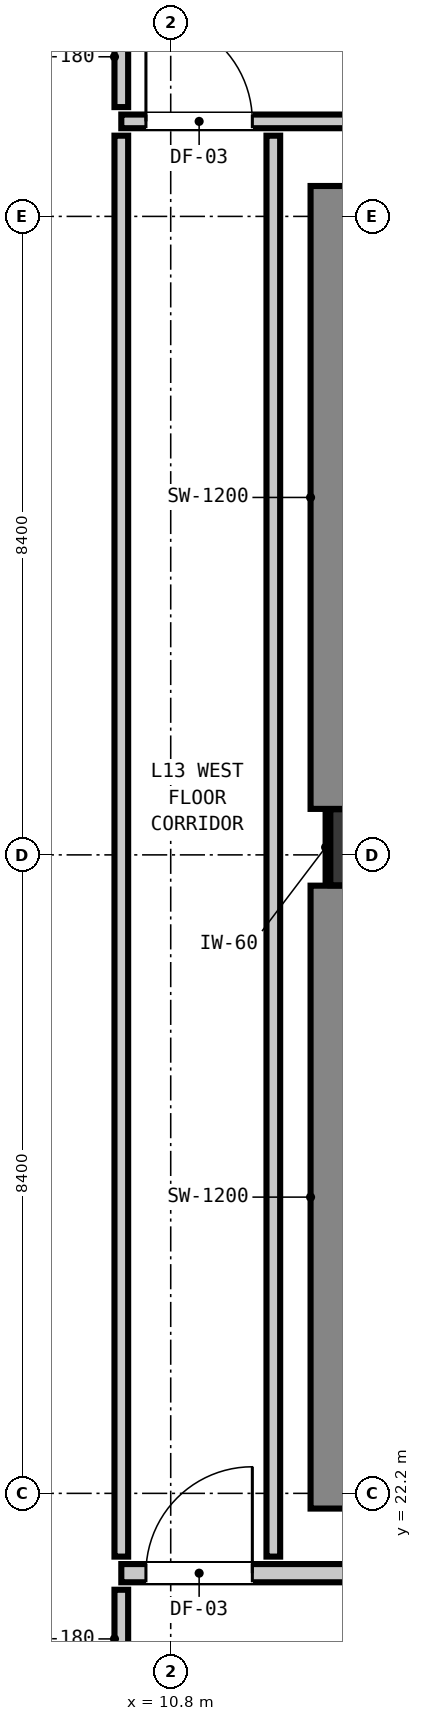
"""IFC4 building model, lengths in metres.
Left out: names, types, materials, properties, quantities, classifications, styles, units other than length and angle.
Written with IfcOpenShell. Run it as: python <this file> out.ifc"""

import sys

from ifc_helpers import new_model, si_unit, direction, frame, frame_2d, origin, origin_2d, place, context, subcontext, project, spatial, rectangle, extrude, element, fill, save


model = new_model("IFC4")
c1 = context("Model", 3, precision=1e-05, world=origin(), true_north=direction((0.0, 1.0)))
c2 = subcontext(c1, "Body", "Model", "MODEL_VIEW")
j1 = project(units=[si_unit("LENGTHUNIT", "METRE"), si_unit("PLANEANGLEUNIT", "RADIAN")], contexts=[c1])
p1 = place(None, origin())
s1 = spatial("IfcSite", under=j1, at=p1, CompositionType="ELEMENT")
p2 = place(p1, origin())
s2 = spatial("IfcBuilding", under=s1, at=p2, CompositionType="ELEMENT")
p3 = place(p2, frame((0.0, 0.0, 48.56)))
s3 = spatial("IfcBuildingStorey", under=s2, at=p3, CompositionType="ELEMENT", Elevation=48.56)
p4 = place(p3, frame((13.4, 30.7, 0.0), z_axis=(0.0, 0.0, 1.0), x_axis=(1.0, 0.0, 0.0)))
e1 = element("IfcColumn", 1, at=p4, inside=s3, PredefinedType="COLUMN", context=c2, shape_type="SweptSolid", body=[
    extrude(rectangle(XDim=1.0, YDim=1.0, at=origin_2d()), origin(), (0.0, 0.0, 1.0), 3.32),
])
p5 = place(p3, frame((13.24, 22.0, 0.0), z_axis=(0.0, 0.0, 1.0), x_axis=(0.0, 1.0, 0.0)))
e2 = element("IfcWall", 2, at=p5, inside=s3, PredefinedType="SHEAR", context=c2, shape_type="SweptSolid", body=[
    extrude(rectangle(XDim=8.195, YDim=1.2, at=frame_2d((4.098, 0.0))), origin(), (0.0, 0.0, 1.0), 3.32),
])
p6 = place(p3, frame((13.24, 31.205, 0.0), z_axis=(0.0, 0.0, 1.0), x_axis=(0.0, 1.0, 0.0)))
e3 = element("IfcWall", 3, at=p6, inside=s3, PredefinedType="SHEAR", context=c2, shape_type="SweptSolid", body=[
    extrude(rectangle(XDim=8.195, YDim=1.2, at=frame_2d((4.097, 0.0))), origin(), (0.0, 0.0, 1.0), 3.32),
])
p7 = place(p3, frame((10.15, 21.15, 0.0), z_axis=(0.0, 0.0, 1.0), x_axis=(1.0, 0.0, 0.0)))
e4 = element("IfcWall", 4, at=p7, inside=s3, PredefinedType="PARTITIONING", context=c2, shape_type="SweptSolid", body=[
    extrude(rectangle(XDim=40.023, YDim=0.24, at=frame_2d((20.012, 0.0))), origin(), (0.0, 0.0, 1.0), 3.06),
])
p8 = place(p7, frame((8.06, 0.0, 0.0)))
e5 = element("IfcOpeningElement", 5, at=p8, cuts=e4, PredefinedType="OPENING", context=c2, shape_type="SweptSolid", body=[
    extrude(rectangle(XDim=1.1, YDim=2.15, at=frame_2d((0.55, 1.075))), frame((0.0, 0.13, 0.0), z_axis=(0.0, -1.0, 0.0), x_axis=(1.0, 0.0, 0.0)), (0.0, 0.0, 1.0), 0.26),
])
p9 = place(p7, frame((0.324, 0.0, 0.0)))
e6 = element("IfcOpeningElement", 6, at=p9, cuts=e4, PredefinedType="OPENING", context=c2, shape_type="SweptSolid", body=[
    extrude(rectangle(XDim=1.4, YDim=2.15, at=frame_2d((0.7, 1.075))), frame((0.0, 0.13, 0.0), z_axis=(0.0, -1.0, 0.0), x_axis=(1.0, 0.0, 0.0)), (0.0, 0.0, 1.0), 0.26),
])
p10 = place(p7, frame((33.351, 0.0, 0.0)))
e7 = element("IfcOpeningElement", 7, at=p10, cuts=e4, PredefinedType="OPENING", context=c2, shape_type="SweptSolid", body=[
    extrude(rectangle(XDim=0.9, YDim=2.1, at=frame_2d((0.45, 1.05))), frame((0.0, 0.13, 0.0), z_axis=(0.0, -1.0, 0.0), x_axis=(1.0, 0.0, 0.0)), (0.0, 0.0, 1.0), 0.26),
])
p11 = place(p3, frame((10.15, 40.25, 0.0), z_axis=(0.0, 0.0, 1.0), x_axis=(1.0, 0.0, 0.0)))
e8 = element("IfcWall", 8, at=p11, inside=s3, PredefinedType="PARTITIONING", context=c2, shape_type="SweptSolid", body=[
    extrude(rectangle(XDim=26.782, YDim=0.18, at=frame_2d((13.391, 0.0))), origin(), (0.0, 0.0, 1.0), 3.06),
])
p12 = place(p11, frame((7.285, 0.0, 0.0)))
e9 = element("IfcOpeningElement", 9, at=p12, cuts=e8, PredefinedType="OPENING", context=c2, shape_type="SweptSolid", body=[
    extrude(rectangle(XDim=1.4, YDim=2.15, at=frame_2d((0.7, 1.075))), frame((0.0, 0.1, 0.0), z_axis=(0.0, -1.0, 0.0), x_axis=(1.0, 0.0, 0.0)), (0.0, 0.0, 1.0), 0.2),
])
p13 = place(p11, frame((0.324, 0.0, 0.0)))
e10 = element("IfcOpeningElement", 10, at=p13, cuts=e8, PredefinedType="OPENING", context=c2, shape_type="SweptSolid", body=[
    extrude(rectangle(XDim=1.4, YDim=2.15, at=frame_2d((0.7, 1.075))), frame((0.0, 0.1, 0.0), z_axis=(0.0, -1.0, 0.0), x_axis=(1.0, 0.0, 0.0)), (0.0, 0.0, 1.0), 0.2),
])
p14 = place(p3, frame((10.15, 19.638, 0.0), z_axis=(0.0, 0.0, 1.0), x_axis=(0.0, 1.0, 0.0)))
e11 = element("IfcWall", 11, at=p14, inside=s3, PredefinedType="PARTITIONING", context=c2, shape_type="SweptSolid", body=[
    extrude(rectangle(XDim=1.294, YDim=0.18, at=frame_2d((0.647, 0.0))), origin(), (0.0, 0.0, 1.0), 3.06),
])
p15 = place(p3, frame((10.15, 21.368, 0.0), z_axis=(0.0, 0.0, 1.0), x_axis=(0.0, 1.0, 0.0)))
e12 = element("IfcWall", 12, at=p15, inside=s3, PredefinedType="PARTITIONING", context=c2, shape_type="SweptSolid", body=[
    extrude(rectangle(XDim=18.694, YDim=0.18, at=frame_2d((9.347, 0.0))), origin(), (0.0, 0.0, 1.0), 3.06),
])
p16 = place(p3, frame((10.15, 40.438, 0.0), z_axis=(0.0, 0.0, 1.0), x_axis=(0.0, 1.0, 0.0)))
e13 = element("IfcWall", 13, at=p16, inside=s3, PredefinedType="PARTITIONING", context=c2, shape_type="SweptSolid", body=[
    extrude(rectangle(XDim=1.324, YDim=0.18, at=frame_2d((0.662, 0.0))), origin(), (0.0, 0.0, 1.0), 2.445),
])
p17 = place(p3, frame((12.15, 21.368, 0.0), z_axis=(0.0, 0.0, 1.0), x_axis=(0.0, 1.0, 0.0)))
e14 = element("IfcWall", 14, at=p17, inside=s3, PredefinedType="PARTITIONING", context=c2, shape_type="SweptSolid", body=[
    extrude(rectangle(XDim=18.694, YDim=0.18, at=frame_2d((9.347, 0.0))), origin(), (0.0, 0.0, 1.0), 3.06),
])
p18 = place(p3, frame((12.868, 30.21, 0.0), z_axis=(0.0, 0.0, 1.0), x_axis=(0.0, 1.0, 0.0)))
e15 = element("IfcWall", 15, at=p18, inside=s3, PredefinedType="PARTITIONING", context=c2, shape_type="SweptSolid", body=[
    extrude(rectangle(XDim=0.98, YDim=0.06, at=frame_2d((0.49, 0.0))), origin(), (0.0, 0.0, 1.0), 1.45),
])
p19 = place(p9, origin())
e16 = element("IfcDoor", 16, at=p19, inside=s3, OperationType="SINGLE_SWING_RIGHT", PredefinedType="DOOR", context=c2, shape_type="SweptSolid", body=[
    extrude(rectangle(XDim=1.4, YDim=2.15, at=frame_2d((0.7, 1.075))), frame((0.0, 0.025, 0.0), z_axis=(0.0, -1.0, 0.0), x_axis=(1.0, 0.0, 0.0)), (0.0, 0.0, 1.0), 0.05),
])
fill(e6, e16)
p20 = place(p13, origin())
e17 = element("IfcDoor", 17, at=p20, inside=s3, OperationType="SINGLE_SWING_LEFT", PredefinedType="DOOR", context=c2, shape_type="SweptSolid", body=[
    extrude(rectangle(XDim=1.4, YDim=2.15, at=frame_2d((0.7, 1.075))), frame((0.0, 0.025, 0.0), z_axis=(0.0, -1.0, 0.0), x_axis=(1.0, 0.0, 0.0)), (0.0, 0.0, 1.0), 0.05),
])
fill(e10, e17)
save(model, sys.argv[1])
